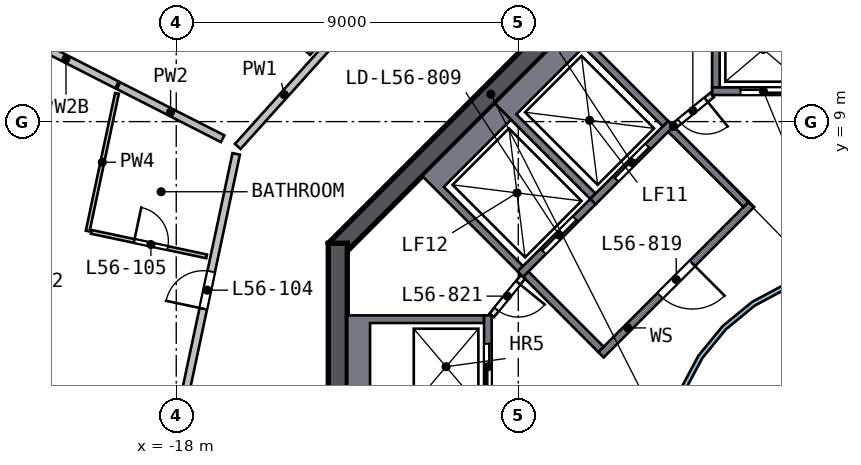
"""IFC4 building model, lengths in metres.
Left out: names, types, materials, properties, quantities, classifications, styles, units other than length and angle.
Written with IfcOpenShell. Run it as: python <this file> out.ifc"""

import sys

from ifc_helpers import new_model, si_unit, direction, frame, frame_2d, origin, place, context, subcontext, project, spatial, polyline, rectangle, outline, extrude, element, fill, save


model = new_model("IFC4")
c1 = context("Model", 3, precision=1e-05, world=origin(), true_north=direction((0.0, 1.0)))
c2 = subcontext(c1, "Body", "Model", "MODEL_VIEW")
j1 = project(units=[si_unit("LENGTHUNIT", "METRE"), si_unit("PLANEANGLEUNIT", "RADIAN")], contexts=[c1])
p1 = place(None, origin())
s1 = spatial("IfcSite", under=j1, at=p1, CompositionType="ELEMENT")
p2 = place(p1, origin())
s2 = spatial("IfcBuilding", under=s1, at=p2, CompositionType="ELEMENT")
p3 = place(p2, frame((0.0, 0.0, 230.5)))
s3 = spatial("IfcBuildingStorey", under=s2, at=p3, CompositionType="ELEMENT", Elevation=230.5)
p4 = place(p3, frame((-5.622, 13.823, 0.0), z_axis=(0.0, 0.0, 1.0), x_axis=(-0.707106781, -0.707106781, 0.0)))
e1 = element("IfcWall", 1, at=p4, inside=s3, PredefinedType="SHEAR", context=c2, shape_type="SweptSolid", body=[
    extrude(rectangle(XDim=11.598, YDim=0.5, at=frame_2d((5.799, 0.0))), origin(), (0.0, 0.0, 1.0), 3.5),
])
p5 = place(p3, frame((-13.75, 5.799, 0.0), z_axis=(0.0, 0.0, 1.0), x_axis=(0.0, -1.0, 0.0)))
e2 = element("IfcWall", 2, at=p5, inside=s3, PredefinedType="SHEAR", context=c2, shape_type="SweptSolid", body=[
    extrude(rectangle(XDim=11.598, YDim=0.5, at=frame_2d((5.799, 0.0))), origin(), (0.0, 0.0, 1.0), 3.5),
])
p6 = place(p5, frame((4.899, 0.0, 0.0)))
e3 = element("IfcOpeningElement", 3, at=p6, cuts=e2, PredefinedType="OPENING", context=c2, shape_type="SweptSolid", body=[
    extrude(rectangle(XDim=1.8, YDim=2.1, at=frame_2d((0.9, 1.05))), frame((0.0, 0.26, 0.0), z_axis=(0.0, -1.0, 0.0), x_axis=(1.0, 0.0, 0.0)), (0.0, 0.0, 1.0), 0.52),
])
p7 = place(p3, origin())
e4 = element("IfcWall", 4, at=p7, inside=s3, PredefinedType="SOLIDWALL", context=c2, shape_type="SweptSolid", body=[
    extrude(outline(polyline([(-3.9, 13.5), (-1.2, 13.5), (-1.2, 9.9), (-1.4, 9.9), (-1.4, 12.9), (-3.7, 12.9), (-3.7, 9.9), (-3.9, 9.9), (-3.9, 13.5)])), origin(), (0.0, 0.0, 1.0), 3.19),
])
p8 = place(p3, frame((-1.2, 9.8, 0.0), z_axis=(0.0, 0.0, 1.0), x_axis=(-1.0, 0.0, 0.0)))
e5 = element("IfcWall", 5, at=p8, inside=s3, PredefinedType="SOLIDWALL", context=c2, shape_type="SweptSolid", body=[
    extrude(rectangle(XDim=2.7, YDim=0.2, at=frame_2d((1.35, 0.0))), origin(), (0.0, 0.0, 1.0), 3.19),
])
p9 = place(p8, frame((0.75, 0.0, 0.0)))
e6 = element("IfcOpeningElement", 6, at=p9, cuts=e5, PredefinedType="OPENING", context=c2, shape_type="SweptSolid", body=[
    extrude(rectangle(XDim=1.2, YDim=2.1, at=frame_2d((0.6, 1.05))), frame((0.0, 0.11, 0.0), z_axis=(0.0, -1.0, 0.0), x_axis=(1.0, 0.0, 0.0)), (0.0, 0.0, 1.0), 0.22),
])
p10 = place(p3, origin())
e7 = element("IfcWall", 7, at=p10, inside=s3, PredefinedType="SOLIDWALL", context=c2, shape_type="SweptSolid", body=[
    extrude(outline(polyline([(-13.5, 3.9), (-9.9, 3.9), (-9.9, 3.7), (-12.9, 3.7), (-12.9, 1.4), (-9.9, 1.4), (-9.9, 1.2), (-13.5, 1.2), (-13.5, 3.9)])), origin(), (0.0, 0.0, 1.0), 3.19),
])
p11 = place(p3, frame((-9.8, 1.2, 0.0), z_axis=(0.0, 0.0, 1.0), x_axis=(0.0, 1.0, 0.0)))
e8 = element("IfcWall", 8, at=p11, inside=s3, PredefinedType="SOLIDWALL", context=c2, shape_type="SweptSolid", body=[
    extrude(rectangle(XDim=2.7, YDim=0.2, at=frame_2d((1.35, 0.0))), origin(), (0.0, 0.0, 1.0), 3.19),
])
p12 = place(p11, frame((0.75, 0.0, 0.0)))
e9 = element("IfcOpeningElement", 9, at=p12, cuts=e8, PredefinedType="OPENING", context=c2, shape_type="SweptSolid", body=[
    extrude(rectangle(XDim=1.2, YDim=2.1, at=frame_2d((0.6, 1.05))), frame((0.0, 0.11, 0.0), z_axis=(0.0, -1.0, 0.0), x_axis=(1.0, 0.0, 0.0)), (0.0, 0.0, 1.0), 0.22),
])
p13 = place(p3, origin())
e10 = element("IfcWall", 10, at=p13, inside=s3, PredefinedType="SOLIDWALL", context=c2, shape_type="SweptSolid", body=[
    extrude(outline(polyline([(-9.617, 9.475), (-7.566, 11.526), (-5.056, 9.016), (-5.197, 8.874), (-7.283, 10.96), (-9.051, 9.192), (-6.965, 7.106), (-7.106, 6.965), (-9.617, 9.475)])), origin(), (0.0, 0.0, 1.0), 3.19),
])
p14 = place(p3, frame((-4.985, 8.945, 0.0), z_axis=(0.0, 0.0, 1.0), x_axis=(-0.707106781, -0.707106781, 0.0)))
e11 = element("IfcWall", 11, at=p14, inside=s3, PredefinedType="SOLIDWALL", context=c2, shape_type="SweptSolid", body=[
    extrude(rectangle(XDim=2.9, YDim=0.2, at=frame_2d((1.45, 0.0))), origin(), (0.0, 0.0, 1.0), 3.19),
])
p15 = place(p14, frame((0.85, 0.0, 0.0)))
e12 = element("IfcOpeningElement", 12, at=p15, cuts=e11, PredefinedType="OPENING", context=c2, shape_type="SweptSolid", body=[
    extrude(rectangle(XDim=1.2, YDim=2.1, at=frame_2d((0.6, 1.05))), frame((0.0, 0.11, 0.0), z_axis=(0.0, -1.0, 0.0), x_axis=(1.0, 0.0, 0.0)), (0.0, 0.0, 1.0), 0.22),
])
p16 = place(p3, origin())
e13 = element("IfcWall", 13, at=p16, inside=s3, PredefinedType="SOLIDWALL", context=c2, shape_type="SweptSolid", body=[
    extrude(outline(polyline([(-11.526, 7.566), (-9.617, 9.475), (-9.192, 9.051), (-10.96, 7.283), (-8.874, 5.197), (-9.016, 5.056), (-11.526, 7.566)])), origin(), (0.0, 0.0, 1.0), 3.19),
])
p17 = place(p3, frame((-7.036, 6.894, 0.0), z_axis=(0.0, 0.0, 1.0), x_axis=(-0.707106781, -0.707106781, 0.0)))
e14 = element("IfcWall", 14, at=p17, inside=s3, PredefinedType="SOLIDWALL", context=c2, shape_type="SweptSolid", body=[
    extrude(rectangle(XDim=2.7, YDim=0.2, at=frame_2d((1.35, 0.0))), origin(), (0.0, 0.0, 1.0), 3.19),
])
p18 = place(p17, frame((0.65, 0.0, 0.0)))
e15 = element("IfcOpeningElement", 15, at=p18, cuts=e14, PredefinedType="OPENING", context=c2, shape_type="SweptSolid", body=[
    extrude(rectangle(XDim=1.2, YDim=2.1, at=frame_2d((0.6, 1.05))), frame((0.0, 0.11, 0.0), z_axis=(0.0, -1.0, 0.0), x_axis=(1.0, 0.0, 0.0)), (0.0, 0.0, 1.0), 0.22),
])
p19 = place(p3, frame((-2.864, 6.823, 0.0), z_axis=(0.0, 0.0, 1.0), x_axis=(-0.707106781, -0.707106781, 0.0)))
e16 = element("IfcWall", 16, at=p19, inside=s3, PredefinedType="SOLIDWALL", context=c2, shape_type="SweptSolid", body=[
    extrude(rectangle(XDim=5.6, YDim=0.2, at=frame_2d((2.8, 0.0))), origin(), (0.0, 0.0, 1.0), 3.19),
])
p20 = place(p19, frame((2.2, 0.0, 0.0)))
e17 = element("IfcOpeningElement", 17, at=p20, cuts=e16, PredefinedType="OPENING", context=c2, shape_type="SweptSolid", body=[
    extrude(rectangle(XDim=1.2, YDim=2.1, at=frame_2d((0.6, 1.05))), frame((0.0, 0.11, 0.0), z_axis=(0.0, -1.0, 0.0), x_axis=(1.0, 0.0, 0.0)), (0.0, 0.0, 1.0), 0.22),
])
for number, where, z_axis, x_axis in (
    (18, (-3.005, 6.823, 0.0), (0.0, 0.0, 1.0), (-0.707, 0.707, 0.0)),
    (19, (-6.823, 3.005, 0.0), (0.0, 0.0, 1.0), (-0.707, 0.707, 0.0)),
):
    element("IfcWall", number, at=place(p3, frame(where, z_axis=z_axis, x_axis=x_axis)), inside=s3, PredefinedType="SOLIDWALL", context=c2, shape_type="SweptSolid", body=[
        extrude(rectangle(XDim=2.8, YDim=0.2, at=frame_2d((1.4, 0.0))), origin(), (0.0, 0.0, 1.0), 3.19),
    ])
p21 = place(p3, frame((-3.9, 9.7, 0.0), z_axis=(0.0, 0.0, 1.0), x_axis=(-0.775559878, -0.631274009, 0.0)))
e20 = element("IfcWall", 20, at=p21, inside=s3, PredefinedType="PARTITIONING", context=c2, shape_type="SweptSolid", body=[
    extrude(rectangle(XDim=1.308, YDim=0.15, at=frame_2d((0.654, 0.0))), origin(), (0.0, 0.0, 1.0), 3.19),
])
p22 = place(p21, frame((0.204, 0.0, 0.0)))
e21 = element("IfcOpeningElement", 21, at=p22, cuts=e20, PredefinedType="OPENING", context=c2, shape_type="SweptSolid", body=[
    extrude(rectangle(XDim=0.9, YDim=2.1, at=frame_2d((0.45, 1.05))), frame((0.0, 0.085, 0.0), z_axis=(0.0, -1.0, 0.0), x_axis=(1.0, 0.0, 0.0)), (0.0, 0.0, 1.0), 0.17),
])
p23 = place(p3, frame((-8.874, 4.914, 0.0), z_axis=(0.0, 0.0, 1.0), x_axis=(-0.631274009, -0.775559878, 0.0)))
e22 = element("IfcWall", 22, at=p23, inside=s3, PredefinedType="PARTITIONING", context=c2, shape_type="SweptSolid", body=[
    extrude(rectangle(XDim=1.308, YDim=0.15, at=frame_2d((0.654, 0.0))), origin(), (0.0, 0.0, 1.0), 3.19),
])
p24 = place(p23, frame((0.204, 0.0, 0.0)))
e23 = element("IfcOpeningElement", 23, at=p24, cuts=e22, PredefinedType="OPENING", context=c2, shape_type="SweptSolid", body=[
    extrude(rectangle(XDim=0.9, YDim=2.1, at=frame_2d((0.45, 1.05))), frame((0.0, 0.085, 0.0), z_axis=(0.0, -1.0, 0.0), x_axis=(1.0, 0.0, 0.0)), (0.0, 0.0, 1.0), 0.17),
])
p25 = place(p3, origin())
e24 = element("IfcWall", 24, at=p25, inside=s3, PredefinedType="SOLIDWALL", context=c2, shape_type="SweptSolid", body=[
    extrude(outline(polyline([(5.021, -0.999), (4.73, -1.959), (4.257, -2.844), (3.62, -3.62), (2.844, -4.257), (1.959, -4.73), (0.999, -5.021), (0.0, -5.12), (-0.999, -5.021), (-1.959, -4.73), (-2.844, -4.257), (-3.62, -3.62), (-4.257, -2.844), (-4.73, -1.959), (-5.021, -0.999), (-5.12, 0.0), (-5.021, 0.999), (-4.73, 1.959), (-4.257, 2.844), (-3.62, 3.62), (-2.844, 4.257), (-1.959, 4.73), (-0.999, 5.021), (0.0, 5.12), (0.999, 5.021), (1.959, 4.73), (2.844, 4.257), (3.62, 3.62), (4.257, 2.844), (4.73, 1.959), (5.021, 0.999), (5.12, 0.0), (5.021, -0.999)]), holes=[polyline([(4.904, 0.976), (4.619, 1.913), (4.157, 2.778), (3.535, 3.535), (2.778, 4.157), (1.913, 4.619), (0.976, 4.904), (0.0, 5.0), (-0.976, 4.904), (-1.913, 4.619), (-2.778, 4.157), (-3.535, 3.535), (-4.157, 2.778), (-4.619, 1.913), (-4.904, 0.976), (-5.0, 0.0), (-4.904, -0.976), (-4.619, -1.913), (-4.157, -2.778), (-3.535, -3.535), (-2.778, -4.157), (-1.913, -4.619), (-0.976, -4.904), (0.0, -5.0), (0.976, -4.904), (1.913, -4.619), (2.778, -4.157), (3.535, -3.535), (4.157, -2.778), (4.619, -1.913), (4.904, -0.976), (5.0, 0.0), (4.904, 0.976)])]), origin(), (0.0, 0.0, 1.0), 3.19),
])
p26 = place(p3, frame((-18.36, -0.962, 0.0), z_axis=(0.0, 0.0, 1.0), x_axis=(0.207919873, 0.978145861, 0.0)))
e25 = element("IfcWall", 25, at=p26, inside=s3, PredefinedType="SOLIDWALL", context=c2, shape_type="SweptSolid", body=[
    extrude(rectangle(XDim=9.316, YDim=0.2, at=frame_2d((4.658, 0.0))), origin(), (0.0, 0.0, 1.0), 3.19),
])
p27 = place(p26, frame((5.15, 0.0, 0.0)))
e26 = element("IfcOpeningElement", 26, at=p27, cuts=e25, PredefinedType="OPENING", context=c2, shape_type="SweptSolid", body=[
    extrude(rectangle(XDim=1.0, YDim=2.1, at=frame_2d((0.5, 1.05))), frame((0.0, 0.11, 0.0), z_axis=(0.0, -1.0, 0.0), x_axis=(1.0, 0.0, 0.0)), (0.0, 0.0, 1.0), 0.22),
])
p28 = place(p3, frame((-16.381, 8.346, 0.0), z_axis=(0.0, 0.0, 1.0), x_axis=(0.669131961, 0.743143605, 0.0)))
e27 = element("IfcWall", 27, at=p28, inside=s3, PredefinedType="SOLIDWALL", context=c2, shape_type="SweptSolid", body=[
    extrude(rectangle(XDim=9.517, YDim=0.2, at=frame_2d((4.758, 0.0))), origin(), (0.0, 0.0, 1.0), 3.19),
])
p29 = place(p28, frame((3.863, 0.0, 0.0)))
e28 = element("IfcOpeningElement", 28, at=p29, cuts=e27, PredefinedType="OPENING", context=c2, shape_type="SweptSolid", body=[
    extrude(rectangle(XDim=1.8, YDim=2.1, at=frame_2d((0.9, 1.05))), frame((0.0, 0.11, 0.0), z_axis=(0.0, -1.0, 0.0), x_axis=(1.0, 0.0, 0.0)), (0.0, 0.0, 1.0), 0.22),
])
p30 = place(p3, frame((-19.56, 9.966, 0.0), z_axis=(0.0, 0.0, 1.0), x_axis=(-0.891012893, 0.453978, 0.0)))
e29 = element("IfcWall", 29, at=p30, inside=s3, PredefinedType="SOLIDWALL", context=c2, shape_type="SweptSolid", body=[
    extrude(rectangle(XDim=3.011, YDim=0.2, at=frame_2d((1.506, 0.0))), origin(), (0.0, 0.0, 1.0), 2.69),
])
p31 = place(p3, frame((-14.414, 10.831, 0.0), z_axis=(0.0, 0.0, 1.0), x_axis=(-0.743141846, 0.669133915, 0.0)))
e30 = element("IfcWall", 30, at=p31, inside=s3, PredefinedType="SOLIDWALL", context=c2, shape_type="SweptSolid", body=[
    extrude(rectangle(XDim=12.038, YDim=0.2, at=frame_2d((6.019, 0.0))), origin(), (0.0, 0.0, 1.0), 3.19),
])
p32 = place(p31, frame((3.65, 0.0, 0.0)))
e31 = element("IfcOpeningElement", 31, at=p32, cuts=e30, PredefinedType="OPENING", context=c2, shape_type="SweptSolid", body=[
    extrude(rectangle(XDim=1.0, YDim=2.1, at=frame_2d((0.5, 1.05))), frame((0.0, 0.11, 0.0), z_axis=(0.0, -1.0, 0.0), x_axis=(1.0, 0.0, 0.0)), (0.0, 0.0, 1.0), 0.22),
])
p33 = place(p3, frame((-16.779, 8.55, 0.0), z_axis=(0.0, 0.0, 1.0), x_axis=(-0.891035255, 0.453934107, 0.0)))
e32 = element("IfcWall", 32, at=p33, inside=s3, PredefinedType="SOLIDWALL", context=c2, shape_type="SweptSolid", body=[
    extrude(rectangle(XDim=3.075, YDim=0.2, at=frame_2d((1.537, 0.0))), origin(), (0.0, 0.0, 1.0), 3.19),
])
p34 = place(p3, frame((-20.33, 6.119, 0.0), z_axis=(0.0, 0.0, 1.0), x_axis=(0.207890288, 0.97815215, 0.0)))
e33 = element("IfcWall", 33, at=p34, inside=s3, PredefinedType="PARTITIONING", context=c2, shape_type="SweptSolid", body=[
    extrude(rectangle(XDim=3.704, YDim=0.1, at=frame_2d((1.852, 0.0))), origin(), (0.0, 0.0, 1.0), 3.19),
])
p35 = place(p3, frame((-20.233, 6.098, 0.0), z_axis=(0.0, 0.0, 1.0), x_axis=(0.978150244, -0.207899255, 0.0)))
e34 = element("IfcWall", 34, at=p35, inside=s3, PredefinedType="PARTITIONING", context=c2, shape_type="SweptSolid", body=[
    extrude(rectangle(XDim=3.1, YDim=0.1, at=frame_2d((1.55, 0.0))), origin(), (0.0, 0.0, 1.0), 3.19),
])
p36 = place(p35, frame((1.15, 0.0, 0.0)))
e35 = element("IfcOpeningElement", 35, at=p36, cuts=e34, PredefinedType="OPENING", context=c2, shape_type="SweptSolid", body=[
    extrude(rectangle(XDim=0.9, YDim=2.1, at=frame_2d((0.45, 1.05))), frame((0.0, 0.06, 0.0), z_axis=(0.0, -1.0, 0.0), x_axis=(1.0, 0.0, 0.0)), (0.0, 0.0, 1.0), 0.12),
])
p37 = place(p9, origin())
e36 = element("IfcDoor", 36, at=p37, inside=s3, OperationType="DOUBLE_DOOR_SLIDING", PredefinedType="DOOR", context=c2, shape_type="SweptSolid", body=[
    extrude(rectangle(XDim=1.2, YDim=2.1, at=frame_2d((0.6, 1.05))), frame((0.0, 0.025, 0.0), z_axis=(0.0, -1.0, 0.0), x_axis=(1.0, 0.0, 0.0)), (0.0, 0.0, 1.0), 0.05),
])
fill(e6, e36)
p38 = place(p12, origin())
e37 = element("IfcDoor", 37, at=p38, inside=s3, OperationType="DOUBLE_DOOR_SLIDING", PredefinedType="DOOR", context=c2, shape_type="SweptSolid", body=[
    extrude(rectangle(XDim=1.2, YDim=2.1, at=frame_2d((0.6, 1.05))), frame((0.0, 0.025, 0.0), z_axis=(0.0, -1.0, 0.0), x_axis=(1.0, 0.0, 0.0)), (0.0, 0.0, 1.0), 0.05),
])
fill(e9, e37)
p39 = place(p15, origin())
e38 = element("IfcDoor", 38, at=p39, inside=s3, OperationType="DOUBLE_DOOR_SLIDING", PredefinedType="DOOR", context=c2, shape_type="SweptSolid", body=[
    extrude(rectangle(XDim=1.2, YDim=2.1, at=frame_2d((0.6, 1.05))), frame((0.0, 0.025, 0.0), z_axis=(0.0, -1.0, 0.0), x_axis=(1.0, 0.0, 0.0)), (0.0, 0.0, 1.0), 0.05),
])
fill(e12, e38)
p40 = place(p18, origin())
e39 = element("IfcDoor", 39, at=p40, inside=s3, OperationType="DOUBLE_DOOR_SLIDING", PredefinedType="DOOR", context=c2, shape_type="SweptSolid", body=[
    extrude(rectangle(XDim=1.2, YDim=2.1, at=frame_2d((0.6, 1.05))), frame((0.0, 0.025, 0.0), z_axis=(0.0, -1.0, 0.0), x_axis=(1.0, 0.0, 0.0)), (0.0, 0.0, 1.0), 0.05),
])
fill(e15, e39)
p41 = place(p20, origin())
e40 = element("IfcDoor", 40, at=p41, inside=s3, OperationType="SINGLE_SWING_LEFT", PredefinedType="DOOR", context=c2, shape_type="SweptSolid", body=[
    extrude(rectangle(XDim=1.2, YDim=2.1, at=frame_2d((0.6, 1.05))), frame((0.0, 0.025, 0.0), z_axis=(0.0, -1.0, 0.0), x_axis=(1.0, 0.0, 0.0)), (0.0, 0.0, 1.0), 0.05),
])
fill(e17, e40)
p42 = place(p22, origin())
e41 = element("IfcDoor", 41, at=p42, inside=s3, OperationType="SINGLE_SWING_LEFT", PredefinedType="DOOR", context=c2, shape_type="SweptSolid", body=[
    extrude(rectangle(XDim=0.9, YDim=2.1, at=frame_2d((0.45, 1.05))), frame((0.0, 0.025, 0.0), z_axis=(0.0, -1.0, 0.0), x_axis=(1.0, 0.0, 0.0)), (0.0, 0.0, 1.0), 0.05),
])
fill(e21, e41)
p43 = place(p24, origin())
e42 = element("IfcDoor", 42, at=p43, inside=s3, OperationType="SINGLE_SWING_LEFT", PredefinedType="DOOR", context=c2, shape_type="SweptSolid", body=[
    extrude(rectangle(XDim=0.9, YDim=2.1, at=frame_2d((0.45, 1.05))), frame((0.0, 0.025, 0.0), z_axis=(0.0, -1.0, 0.0), x_axis=(1.0, 0.0, 0.0)), (0.0, 0.0, 1.0), 0.05),
])
fill(e23, e42)
p44 = place(p27, origin())
e43 = element("IfcDoor", 43, at=p44, inside=s3, OperationType="SINGLE_SWING_LEFT", PredefinedType="DOOR", context=c2, shape_type="SweptSolid", body=[
    extrude(rectangle(XDim=1.0, YDim=2.1, at=frame_2d((0.5, 1.05))), frame((0.0, 0.025, 0.0), z_axis=(0.0, -1.0, 0.0), x_axis=(1.0, 0.0, 0.0)), (0.0, 0.0, 1.0), 0.05),
])
fill(e26, e43)
p45 = place(p36, origin())
e44 = element("IfcDoor", 44, at=p45, inside=s3, OperationType="SINGLE_SWING_LEFT", PredefinedType="DOOR", context=c2, shape_type="SweptSolid", body=[
    extrude(rectangle(XDim=0.9, YDim=2.1, at=frame_2d((0.45, 1.05))), frame((0.0, 0.025, 0.0), z_axis=(0.0, -1.0, 0.0), x_axis=(1.0, 0.0, 0.0)), (0.0, 0.0, 1.0), 0.05),
])
fill(e35, e44)
save(model, sys.argv[1])
